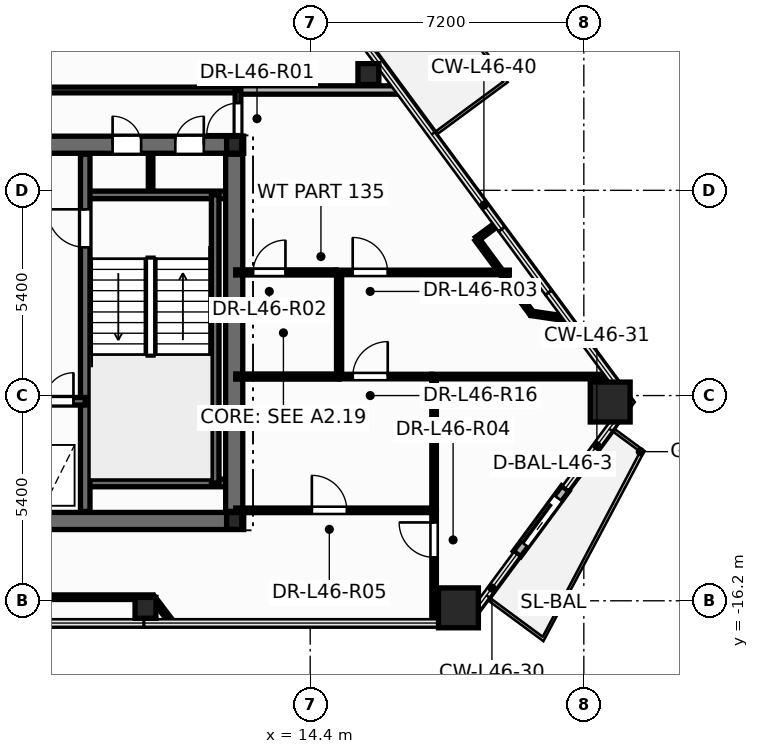
"""IFC4 building model, lengths in metres.
Left out: names, types, materials, properties, quantities, classifications, styles, units other than length and angle.
Written with IfcOpenShell. Run it as: python <this file> out.ifc"""

import sys

from ifc_helpers import new_model, si_unit, direction, frame, frame_2d, origin, origin_2d, place, context, subcontext, project, spatial, rectangle, hollow_rectangle, hollow_circle, i_section, extrude, element, fill, save


model = new_model("IFC4")
c1 = context("Model", 3, precision=1e-05, world=origin(), true_north=direction((0.0, 1.0)))
c2 = subcontext(c1, "Body", "Model", "MODEL_VIEW")
j1 = project(units=[si_unit("LENGTHUNIT", "METRE"), si_unit("PLANEANGLEUNIT", "RADIAN")], contexts=[c1])
p1 = place(None, origin())
s1 = spatial("IfcSite", under=j1, at=p1, CompositionType="ELEMENT")
p2 = place(p1, origin())
s2 = spatial("IfcBuilding", under=s1, at=p2, CompositionType="ELEMENT")
p3 = place(p2, frame((0.0, 0.0, 178.5)))
s3 = spatial("IfcBuildingStorey", under=s2, at=p3, CompositionType="ELEMENT", Elevation=178.5)
for number, where, z_axis, x_axis in (
    (1, (18.301, -16.385, 0.0), (0.0, 0.0, 1.0), (1.0, 0.0, 0.0)),
    (2, (22.294, -10.97, 0.0), (0.0, 0.0, 1.0), (1.0, 0.0, 0.0)),
):
    element("IfcColumn", number, at=place(p3, frame(where, z_axis=z_axis, x_axis=x_axis)), inside=s3, PredefinedType="COLUMN", context=c2, shape_type="SweptSolid", body=[
        extrude(hollow_rectangle(XDim=1.05, YDim=1.05, WallThickness=0.045, at=origin_2d()), origin(), (0.0, 0.0, 1.0), 3.6),
    ])
for number, where, z_axis, x_axis in (
    (3, (10.065, -16.385, 0.0), (0.0, 0.0, 1.0), (1.0, 0.0, 0.0)),
    (4, (15.931, -2.341, 0.0), (0.0, 0.0, 1.0), (1.0, 0.0, 0.0)),
):
    element("IfcColumn", number, at=place(p3, frame(where, z_axis=z_axis, x_axis=x_axis)), inside=s3, PredefinedType="COLUMN", context=c2, shape_type="SweptSolid", body=[
        extrude(hollow_circle(Radius=0.275, WallThickness=0.024, at=origin_2d()), origin(), (0.0, 0.0, 1.0), 3.6),
    ])
for number, where, z_axis, x_axis in (
    (5, (12.4, -14.1, 0.0), (0.0, 0.0, 1.0), (1.0, 0.0, 0.0)),
    (6, (12.4, -4.2, 0.0), (0.0, 0.0, 1.0), (1.0, 0.0, 0.0)),
):
    element("IfcColumn", number, at=place(p3, frame(where, z_axis=z_axis, x_axis=x_axis)), inside=s3, PredefinedType="COLUMN", context=c2, shape_type="SweptSolid", body=[
        extrude(i_section(OverallWidth=0.4, OverallDepth=0.44, WebThickness=0.028, FlangeThickness=0.04, at=origin_2d()), origin(), (0.0, 0.0, 1.0), 3.6),
    ])
p4 = place(p3, frame((19.844, -14.967, -0.015), z_axis=(0.0, 0.0, 1.0), x_axis=(0.593463631131, 0.804860806926, 0.0)))
e7 = element("IfcWall", 7, at=p4, inside=s3, PredefinedType="STANDARD", context=c2, shape_type="SweptSolid", body=[
    extrude(rectangle(XDim=2.14, YDim=0.24, at=frame_2d((1.07, 0.0))), origin(), (0.0, 0.0, 1.0), 2.807),
])
p5 = place(p4, frame((0.32, 0.0, 0.015)))
e8 = element("IfcOpeningElement", 8, at=p5, cuts=e7, PredefinedType="OPENING", context=c2, shape_type="SweptSolid", body=[
    extrude(rectangle(XDim=1.506, YDim=2.204, at=frame_2d((0.75, 1.102))), frame((0.0, 0.13, 0.0), z_axis=(0.0, -1.0, 0.0), x_axis=(1.0, 0.0, 0.0)), (0.0, 0.0, 1.0), 0.26),
])
p6 = place(p3, frame((10.2, -5.52, 0.0), z_axis=(0.0, 0.0, 1.0), x_axis=(0.0, 1.0, 0.0)))
e9 = element("IfcWall", 9, at=p6, inside=s3, PredefinedType="PARTITIONING", context=c2, shape_type="SweptSolid", body=[
    extrude(rectangle(XDim=1.12, YDim=0.12, at=frame_2d((0.56, 0.0))), origin(), (0.0, 0.0, 1.0), 3.35),
])
p7 = place(p3, frame((-12.65, -14.1, 0.0), z_axis=(0.0, 0.0, 1.0), x_axis=(1.0, 0.0, 0.0)))
e10 = element("IfcWall", 10, at=p7, inside=s3, PredefinedType="SHEAR", context=c2, shape_type="SweptSolid", body=[
    extrude(rectangle(XDim=25.3, YDim=0.45, at=frame_2d((12.65, 0.0))), origin(), (0.0, 0.0, 1.0), 3.6),
])
p8 = place(p3, frame((-12.65, -4.2, 0.0), z_axis=(0.0, 0.0, 1.0), x_axis=(1.0, 0.0, 0.0)))
e11 = element("IfcWall", 11, at=p8, inside=s3, PredefinedType="SHEAR", context=c2, shape_type="SweptSolid", body=[
    extrude(rectangle(XDim=25.3, YDim=0.45, at=frame_2d((12.65, 0.0))), origin(), (0.0, 0.0, 1.0), 3.6),
])
p9 = place(p8, frame((1.85, 0.0, 0.0)))
e12 = element("IfcOpeningElement", 12, at=p9, cuts=e11, PredefinedType="OPENING", context=c2, shape_type="SweptSolid", body=[
    extrude(rectangle(XDim=0.756, YDim=2.054, at=frame_2d((0.375, 1.027))), frame((0.0, 0.235, 0.0), z_axis=(0.0, -1.0, 0.0), x_axis=(1.0, 0.0, 0.0)), (0.0, 0.0, 1.0), 0.47),
])
p10 = place(p8, frame((21.85, 0.0, 0.0)))
e13 = element("IfcOpeningElement", 13, at=p10, cuts=e11, PredefinedType="OPENING", context=c2, shape_type="SweptSolid", body=[
    extrude(rectangle(XDim=0.756, YDim=2.054, at=frame_2d((0.375, 1.027))), frame((0.0, 0.235, 0.0), z_axis=(0.0, -1.0, 0.0), x_axis=(1.0, 0.0, 0.0)), (0.0, 0.0, 1.0), 0.47),
])
p11 = place(p8, frame((23.5, 0.0, 0.0)))
e14 = element("IfcOpeningElement", 14, at=p11, cuts=e11, PredefinedType="OPENING", context=c2, shape_type="SweptSolid", body=[
    extrude(rectangle(XDim=0.756, YDim=2.054, at=frame_2d((0.375, 1.027))), frame((0.0, 0.235, 0.0), z_axis=(0.0, -1.0, 0.0), x_axis=(1.0, 0.0, 0.0)), (0.0, 0.0, 1.0), 0.47),
])
p12 = place(p8, frame((5.85, 0.0, 0.0)))
e15 = element("IfcOpeningElement", 15, at=p12, cuts=e11, PredefinedType="OPENING", context=c2, shape_type="SweptSolid", body=[
    extrude(rectangle(XDim=1.006, YDim=2.104, at=frame_2d((0.5, 1.052))), frame((0.0, 0.235, 0.0), z_axis=(0.0, -1.0, 0.0), x_axis=(1.0, 0.0, 0.0)), (0.0, 0.0, 1.0), 0.47),
])
p13 = place(p8, frame((10.35, 0.0, 0.0)))
e16 = element("IfcOpeningElement", 16, at=p13, cuts=e11, PredefinedType="OPENING", context=c2, shape_type="SweptSolid", body=[
    extrude(rectangle(XDim=1.406, YDim=2.154, at=frame_2d((0.7, 1.077))), frame((0.0, 0.235, 0.0), z_axis=(0.0, -1.0, 0.0), x_axis=(1.0, 0.0, 0.0)), (0.0, 0.0, 1.0), 0.47),
])
p14 = place(p8, frame((18.45, 0.0, 0.0)))
e17 = element("IfcOpeningElement", 17, at=p14, cuts=e11, PredefinedType="OPENING", context=c2, shape_type="SweptSolid", body=[
    extrude(rectangle(XDim=1.006, YDim=2.104, at=frame_2d((0.5, 1.052))), frame((0.0, 0.235, 0.0), z_axis=(0.0, -1.0, 0.0), x_axis=(1.0, 0.0, 0.0)), (0.0, 0.0, 1.0), 0.47),
])
for number, where, z_axis, x_axis in (
    (18, (8.48, -5.52, 0.0), (0.0, 0.0, 1.0), (1.0, 0.0, 0.0)),
    (19, (8.48, -13.1, 0.0), (0.0, 0.0, 1.0), (1.0, 0.0, 0.0)),
):
    element("IfcWall", number, at=place(p3, frame(where, z_axis=z_axis, x_axis=x_axis)), inside=s3, PredefinedType="SOLIDWALL", context=c2, shape_type="SweptSolid", body=[
        extrude(rectangle(XDim=3.87, YDim=0.2, at=frame_2d((1.935, 0.0))), origin(), (0.0, 0.0, 1.0), 3.6),
    ])
p15 = place(p3, frame((11.9, -13.1, 0.0), z_axis=(0.0, 0.0, 1.0), x_axis=(0.0, 1.0, 0.0)))
e20 = element("IfcWall", 20, at=p15, inside=s3, PredefinedType="SOLIDWALL", context=c2, shape_type="SweptSolid", body=[
    extrude(rectangle(XDim=7.58, YDim=0.2, at=frame_2d((3.79, 0.0))), origin(), (0.0, 0.0, 1.0), 3.6),
])
p16 = place(p3, frame((8.48, -13.85, 0.0), z_axis=(0.0, 0.0, 1.0), x_axis=(0.0, 1.0, 0.0)))
e21 = element("IfcWall", 21, at=p16, inside=s3, PredefinedType="SHEAR", context=c2, shape_type="SweptSolid", body=[
    extrude(rectangle(XDim=9.4, YDim=0.25, at=frame_2d((4.7, 0.0))), origin(), (0.0, 0.0, 1.0), 3.6),
])
p17 = place(p16, frame((6.95, 0.0, 0.0)))
e22 = element("IfcOpeningElement", 22, at=p17, cuts=e21, PredefinedType="OPENING", context=c2, shape_type="SweptSolid", body=[
    extrude(rectangle(XDim=1.006, YDim=2.104, at=frame_2d((0.5, 1.052))), frame((0.0, 0.135, 0.0), z_axis=(0.0, -1.0, 0.0), x_axis=(1.0, 0.0, 0.0)), (0.0, 0.0, 1.0), 0.27),
])
p18 = place(p3, frame((5.12, -10.95, 0.0), z_axis=(0.0, 0.0, 1.0), x_axis=(1.0, 0.0, 0.0)))
e23 = element("IfcWall", 23, at=p18, inside=s3, PredefinedType="SOLIDWALL", context=c2, shape_type="SweptSolid", body=[
    extrude(rectangle(XDim=3.36, YDim=0.2, at=frame_2d((1.68, 0.0))), origin(), (0.0, 0.0, 1.0), 3.6),
])
p19 = place(p18, frame((0.42, 0.0, 0.0)))
e24 = element("IfcOpeningElement", 24, at=p19, cuts=e23, PredefinedType="OPENING", context=c2, shape_type="SweptSolid", body=[
    extrude(rectangle(XDim=1.106, YDim=2.104, at=frame_2d((0.55, 1.052))), frame((0.0, 0.11, 0.0), z_axis=(0.0, -1.0, 0.0), x_axis=(1.0, 0.0, 0.0)), (0.0, 0.0, 1.0), 0.22),
])
p20 = place(p18, frame((2.3, 0.0, 0.0)))
e25 = element("IfcOpeningElement", 25, at=p20, cuts=e23, PredefinedType="OPENING", context=c2, shape_type="SweptSolid", body=[
    extrude(rectangle(XDim=0.756, YDim=2.054, at=frame_2d((0.375, 1.027))), frame((0.0, 0.11, 0.0), z_axis=(0.0, -1.0, 0.0), x_axis=(1.0, 0.0, 0.0)), (0.0, 0.0, 1.0), 0.22),
])
p21 = place(p3, frame((12.4, -13.85, 0.0), z_axis=(0.0, 0.0, 1.0), x_axis=(0.0, 1.0, 0.0)))
e26 = element("IfcWall", 26, at=p21, inside=s3, PredefinedType="SHEAR", context=c2, shape_type="SweptSolid", body=[
    extrude(rectangle(XDim=9.4, YDim=0.45, at=frame_2d((4.7, 0.0))), origin(), (0.0, 0.0, 1.0), 3.6),
])
p22 = place(p3, frame((1.9, -2.76, 0.0), z_axis=(0.0, 0.0, 1.0), x_axis=(1.0, 0.0, 0.0)))
e27 = element("IfcWall", 27, at=p22, inside=s3, PredefinedType="PARTITIONING", context=c2, shape_type="SweptSolid", body=[
    extrude(rectangle(XDim=10.6, YDim=0.15, at=frame_2d((5.3, 0.0))), origin(), (0.0, 0.0, 1.0), 2.325),
])
p23 = place(p22, frame((0.399, 0.0, 0.0)))
e28 = element("IfcOpeningElement", 28, at=p23, cuts=e27, PredefinedType="OPENING", context=c2, shape_type="SweptSolid", body=[
    extrude(rectangle(XDim=0.956, YDim=2.104, at=frame_2d((0.475, 1.052))), frame((0.0, 0.085, 0.0), z_axis=(0.0, -1.0, 0.0), x_axis=(1.0, 0.0, 0.0)), (0.0, 0.0, 1.0), 0.17),
])
p24 = place(p3, frame((12.44, -13.82, 0.0), z_axis=(0.0, 0.0, 1.0), x_axis=(1.0, 0.0, 0.0)))
e29 = element("IfcWall", 29, at=p24, inside=s3, PredefinedType="PARTITIONING", context=c2, shape_type="SweptSolid", body=[
    extrude(rectangle(XDim=5.22, YDim=0.12, at=frame_2d((2.61, 0.0))), origin(), (0.0, 0.0, 1.0), 2.792),
])
p25 = place(p24, frame((2.003, 0.0, 0.0)))
e30 = element("IfcOpeningElement", 30, at=p25, cuts=e29, PredefinedType="OPENING", context=c2, shape_type="SweptSolid", body=[
    extrude(rectangle(XDim=0.926, YDim=2.104, at=frame_2d((0.46, 1.052))), frame((0.0, 0.07, 0.0), z_axis=(0.0, -1.0, 0.0), x_axis=(1.0, 0.0, 0.0)), (0.0, 0.0, 1.0), 0.14),
])
p26 = place(p3, frame((17.6, -10.3, 0.0), z_axis=(0.0, 0.0, 1.0), x_axis=(1.0, 0.0, 0.0)))
e31 = element("IfcWall", 31, at=p26, inside=s3, PredefinedType="PARTITIONING", context=c2, shape_type="SweptSolid", body=[
    extrude(rectangle(XDim=4.697, YDim=0.12, at=frame_2d((2.348, 0.0))), origin(), (0.0, 0.0, 1.0), 2.325),
])
p27 = place(p3, frame((15.08, -7.56, 0.0), z_axis=(0.0, 0.0, 1.0), x_axis=(1.0, 0.0, 0.0)))
e32 = element("IfcWall", 32, at=p27, inside=s3, PredefinedType="PARTITIONING", context=c2, shape_type="SweptSolid", body=[
    extrude(rectangle(XDim=4.56, YDim=0.12, at=frame_2d((2.28, 0.0))), origin(), (0.0, 0.0, 1.0), 2.325),
])
p28 = place(p27, frame((0.438, 0.0, 0.0)))
e33 = element("IfcOpeningElement", 33, at=p28, cuts=e32, PredefinedType="OPENING", context=c2, shape_type="SweptSolid", body=[
    extrude(rectangle(XDim=0.926, YDim=2.104, at=frame_2d((0.46, 1.052))), frame((0.0, 0.07, 0.0), z_axis=(0.0, -1.0, 0.0), x_axis=(1.0, 0.0, 0.0)), (0.0, 0.0, 1.0), 0.14),
])
p29 = place(p3, frame((12.5, -2.76, 0.0), z_axis=(0.0, 0.0, 1.0), x_axis=(1.0, 0.0, 0.0)))
e34 = element("IfcWall", 34, at=p29, inside=s3, PredefinedType="PARTITIONING", context=c2, shape_type="SweptSolid", body=[
    extrude(rectangle(XDim=4.237, YDim=0.22, at=frame_2d((2.118, 0.0))), origin(), (0.0, 0.0, 1.0), 2.792),
])
p30 = place(p3, frame((6.383, -16.106, 0.0), z_axis=(0.0, 0.0, 1.0), x_axis=(1.0, 0.0, 0.0)))
e35 = element("IfcWall", 35, at=p30, inside=s3, PredefinedType="PARTITIONING", context=c2, shape_type="SweptSolid", body=[
    extrude(rectangle(XDim=3.868, YDim=0.12, at=frame_2d((1.934, 0.0))), origin(), (0.0, 0.0, 1.0), 2.792),
])
p31 = place(p3, frame((17.66, -13.82, 0.0), z_axis=(0.0, 0.0, 1.0), x_axis=(0.0, 1.0, 0.0)))
e36 = element("IfcWall", 36, at=p31, inside=s3, PredefinedType="PARTITIONING", context=c2, shape_type="SweptSolid", body=[
    extrude(rectangle(XDim=3.52, YDim=0.12, at=frame_2d((1.76, 0.0))), origin(), (0.0, 0.0, 1.0), 3.35),
])
p32 = place(p3, frame((17.66, -16.786, 0.0), z_axis=(0.0, 0.0, 1.0), x_axis=(0.0, 1.0, 0.0)))
e37 = element("IfcWall", 37, at=p32, inside=s3, PredefinedType="PARTITIONING", context=c2, shape_type="SweptSolid", body=[
    extrude(rectangle(XDim=2.966, YDim=0.12, at=frame_2d((1.483, 0.0))), origin(), (0.0, 0.0, 1.0), 2.792),
])
p33 = place(p32, frame((1.727, 0.0, 0.0)))
e38 = element("IfcOpeningElement", 38, at=p33, cuts=e37, PredefinedType="OPENING", context=c2, shape_type="SweptSolid", body=[
    extrude(rectangle(XDim=0.926, YDim=2.104, at=frame_2d((0.46, 1.052))), frame((0.0, 0.07, 0.0), z_axis=(0.0, -1.0, 0.0), x_axis=(1.0, 0.0, 0.0)), (0.0, 0.0, 1.0), 0.14),
])
p34 = place(p3, frame((12.44, -7.56, 0.0), z_axis=(0.0, 0.0, 1.0), x_axis=(1.0, 0.0, 0.0)))
e39 = element("IfcWall", 39, at=p34, inside=s3, PredefinedType="PARTITIONING", context=c2, shape_type="SweptSolid", body=[
    extrude(rectangle(XDim=2.638, YDim=0.135, at=frame_2d((1.319, 0.0))), origin(), (0.0, 0.0, 1.0), 2.792),
])
p35 = place(p34, frame((0.458, 0.0, 0.0)))
e40 = element("IfcOpeningElement", 40, at=p35, cuts=e39, PredefinedType="OPENING", context=c2, shape_type="SweptSolid", body=[
    extrude(rectangle(XDim=0.856, YDim=2.104, at=frame_2d((0.425, 1.052))), frame((0.0, 0.078, 0.0), z_axis=(0.0, -1.0, 0.0), x_axis=(1.0, 0.0, 0.0)), (0.0, 0.0, 1.0), 0.155),
])
p36 = place(p3, frame((15.16, -10.3, 0.0), z_axis=(0.0, 0.0, 1.0), x_axis=(0.0, 1.0, 0.0)))
e41 = element("IfcWall", 41, at=p36, inside=s3, PredefinedType="PARTITIONING", context=c2, shape_type="SweptSolid", body=[
    extrude(rectangle(XDim=2.74, YDim=0.135, at=frame_2d((1.37, 0.0))), origin(), (0.0, 0.0, 1.0), 3.35),
])
p37 = place(p3, frame((12.44, -10.3, 0.0), z_axis=(0.0, 0.0, 1.0), x_axis=(1.0, 0.0, 0.0)))
e42 = element("IfcWall", 42, at=p37, inside=s3, PredefinedType="PARTITIONING", context=c2, shape_type="SweptSolid", body=[
    extrude(rectangle(XDim=2.72, YDim=0.135, at=frame_2d((1.36, 0.0))), origin(), (0.0, 0.0, 1.0), 2.792),
])
p38 = place(p3, frame((15.16, -10.3, 0.0), z_axis=(0.0, 0.0, 1.0), x_axis=(1.0, 0.0, 0.0)))
e43 = element("IfcWall", 43, at=p38, inside=s3, PredefinedType="PARTITIONING", context=c2, shape_type="SweptSolid", body=[
    extrude(rectangle(XDim=2.438, YDim=0.12, at=frame_2d((1.219, 0.0))), origin(), (0.0, 0.0, 1.0), 3.35),
])
p39 = place(p38, frame((0.36, 0.0, 0.0)))
e44 = element("IfcOpeningElement", 44, at=p39, cuts=e43, PredefinedType="OPENING", context=c2, shape_type="SweptSolid", body=[
    extrude(rectangle(XDim=0.926, YDim=2.104, at=frame_2d((0.46, 1.052))), frame((0.0, 0.07, 0.0), z_axis=(0.0, -1.0, 0.0), x_axis=(1.0, 0.0, 0.0)), (0.0, 0.0, 1.0), 0.14),
])
p40 = place(p3, frame((20.227, -8.638, 0.0), z_axis=(0.0, 0.0, 1.0), x_axis=(-0.593517740009, 0.804820906969, 0.0)))
e45 = element("IfcWall", 45, at=p40, inside=s3, PredefinedType="PARTITIONING", context=c2, shape_type="SweptSolid", body=[
    extrude(rectangle(XDim=2.43, YDim=0.12, at=frame_2d((1.215, 0.0))), origin(), (0.0, 0.0, 1.0), 3.35),
])
p41 = place(p3, frame((12.5, -4.24, 0.0), z_axis=(0.0, 0.0, 1.0), x_axis=(0.0, 1.0, 0.0)))
e46 = element("IfcWall", 46, at=p41, inside=s3, PredefinedType="PARTITIONING", context=c2, shape_type="SweptSolid", body=[
    extrude(rectangle(XDim=1.48, YDim=0.15, at=frame_2d((0.74, 0.0))), origin(), (0.0, 0.0, 1.0), 2.325),
])
p42 = place(p41, frame((0.315, 0.0, 0.0)))
e47 = element("IfcOpeningElement", 47, at=p42, cuts=e46, PredefinedType="OPENING", context=c2, shape_type="SweptSolid", body=[
    extrude(rectangle(XDim=0.826, YDim=2.104, at=frame_2d((0.41, 1.052))), frame((0.0, 0.085, 0.0), z_axis=(0.0, -1.0, 0.0), x_axis=(1.0, 0.0, 0.0)), (0.0, 0.0, 1.0), 0.17),
])
p43 = place(p3, frame((21.067, -8.763, 0.0), z_axis=(0.0, 0.0, 1.0), x_axis=(-0.989242005698, 0.146288257089, 0.0)))
e48 = element("IfcWall", 48, at=p43, inside=s3, PredefinedType="PARTITIONING", context=c2, shape_type="SweptSolid", body=[
    extrude(rectangle(XDim=0.849, YDim=0.12, at=frame_2d((0.425, 0.0))), origin(), (0.0, 0.0, 1.0), 2.792),
])
p44 = place(p3, frame((10.251, -16.106, 0.0), z_axis=(0.0, 0.0, 1.0), x_axis=(0.604450021585, -0.796643063991, 0.0)))
e49 = element("IfcWall", 49, at=p44, inside=s3, PredefinedType="PARTITIONING", context=c2, shape_type="SweptSolid", body=[
    extrude(rectangle(XDim=0.841, YDim=0.12, at=frame_2d((0.42, 0.0))), origin(), (0.0, 0.0, 1.0), 2.792),
])
p45 = place(p3, frame((18.784, -6.683, 0.0), z_axis=(0.0, 0.0, 1.0), x_axis=(0.804698441933, 0.59368376898, 0.0)))
e50 = element("IfcWall", 50, at=p45, inside=s3, PredefinedType="PARTITIONING", context=c2, shape_type="SweptSolid", body=[
    extrude(rectangle(XDim=0.67, YDim=0.12, at=frame_2d((0.335, 0.0))), origin(), (0.0, 0.0, 1.0), 2.792),
])
p46 = place(p5, origin())
e51 = element("IfcDoor", 51, at=p46, inside=s3, OperationType="SLIDING_TO_RIGHT", PredefinedType="DOOR", context=c2, shape_type="SweptSolid", body=[
    extrude(rectangle(XDim=1.5, YDim=2.2, at=frame_2d((0.75, 1.1))), frame((0.0, 0.025, 0.0), z_axis=(0.0, -1.0, 0.0), x_axis=(1.0, 0.0, 0.0)), (0.0, 0.0, 1.0), 0.05),
])
fill(e8, e51)
p47 = place(p17, origin())
e52 = element("IfcDoor", 52, at=p47, inside=s3, OperationType="SINGLE_SWING_RIGHT", PredefinedType="DOOR", context=c2, shape_type="SweptSolid", body=[
    extrude(rectangle(XDim=1.0, YDim=2.1, at=frame_2d((0.5, 1.05))), frame((0.0, 0.025, 0.0), z_axis=(0.0, -1.0, 0.0), x_axis=(1.0, 0.0, 0.0)), (0.0, 0.0, 1.0), 0.05),
])
fill(e22, e52)
p48 = place(p20, origin())
e53 = element("IfcDoor", 53, at=p48, inside=s3, OperationType="SINGLE_SWING_RIGHT", PredefinedType="DOOR", context=c2, shape_type="SweptSolid", body=[
    extrude(rectangle(XDim=0.75, YDim=2.05, at=frame_2d((0.375, 1.025))), frame((0.0, 0.025, 0.0), z_axis=(0.0, -1.0, 0.0), x_axis=(1.0, 0.0, 0.0)), (0.0, 0.0, 1.0), 0.05),
])
fill(e25, e53)
p49 = place(p10, origin())
e54 = element("IfcDoor", 54, at=p49, inside=s3, OperationType="SINGLE_SWING_LEFT", PredefinedType="DOOR", context=c2, shape_type="SweptSolid", body=[
    extrude(rectangle(XDim=0.75, YDim=2.05, at=frame_2d((0.375, 1.025))), frame((0.0, 0.025, 0.0), z_axis=(0.0, -1.0, 0.0), x_axis=(1.0, 0.0, 0.0)), (0.0, 0.0, 1.0), 0.05),
])
fill(e13, e54)
p50 = place(p11, origin())
e55 = element("IfcDoor", 55, at=p50, inside=s3, OperationType="SINGLE_SWING_RIGHT", PredefinedType="DOOR", context=c2, shape_type="SweptSolid", body=[
    extrude(rectangle(XDim=0.75, YDim=2.05, at=frame_2d((0.375, 1.025))), frame((0.0, 0.025, 0.0), z_axis=(0.0, -1.0, 0.0), x_axis=(1.0, 0.0, 0.0)), (0.0, 0.0, 1.0), 0.05),
])
fill(e14, e55)
p51 = place(p42, origin())
e56 = element("IfcDoor", 56, at=p51, inside=s3, OperationType="SINGLE_SWING_LEFT", PredefinedType="DOOR", context=c2, shape_type="SweptSolid", body=[
    extrude(rectangle(XDim=0.82, YDim=2.1, at=frame_2d((0.41, 1.05))), frame((0.0, 0.025, 0.0), z_axis=(0.0, -1.0, 0.0), x_axis=(1.0, 0.0, 0.0)), (0.0, 0.0, 1.0), 0.05),
])
fill(e47, e56)
p52 = place(p35, origin())
e57 = element("IfcDoor", 57, at=p52, inside=s3, OperationType="SINGLE_SWING_RIGHT", PredefinedType="DOOR", context=c2, shape_type="SweptSolid", body=[
    extrude(rectangle(XDim=0.85, YDim=2.1, at=frame_2d((0.425, 1.05))), frame((0.0, 0.025, 0.0), z_axis=(0.0, -1.0, 0.0), x_axis=(1.0, 0.0, 0.0)), (0.0, 0.0, 1.0), 0.05),
])
fill(e40, e57)
p53 = place(p28, origin())
e58 = element("IfcDoor", 58, at=p53, inside=s3, OperationType="SINGLE_SWING_LEFT", PredefinedType="DOOR", context=c2, shape_type="SweptSolid", body=[
    extrude(rectangle(XDim=0.92, YDim=2.1, at=frame_2d((0.46, 1.05))), frame((0.0, 0.025, 0.0), z_axis=(0.0, -1.0, 0.0), x_axis=(1.0, 0.0, 0.0)), (0.0, 0.0, 1.0), 0.05),
])
fill(e33, e58)
p54 = place(p33, origin())
e59 = element("IfcDoor", 59, at=p54, inside=s3, OperationType="SINGLE_SWING_RIGHT", PredefinedType="DOOR", context=c2, shape_type="SweptSolid", body=[
    extrude(rectangle(XDim=0.92, YDim=2.1, at=frame_2d((0.46, 1.05))), frame((0.0, 0.025, 0.0), z_axis=(0.0, -1.0, 0.0), x_axis=(1.0, 0.0, 0.0)), (0.0, 0.0, 1.0), 0.05),
])
fill(e38, e59)
p55 = place(p25, origin())
e60 = element("IfcDoor", 60, at=p55, inside=s3, OperationType="SINGLE_SWING_LEFT", PredefinedType="DOOR", context=c2, shape_type="SweptSolid", body=[
    extrude(rectangle(XDim=0.92, YDim=2.1, at=frame_2d((0.46, 1.05))), frame((0.0, 0.025, 0.0), z_axis=(0.0, -1.0, 0.0), x_axis=(1.0, 0.0, 0.0)), (0.0, 0.0, 1.0), 0.05),
])
fill(e30, e60)
p56 = place(p39, origin())
e61 = element("IfcDoor", 61, at=p56, inside=s3, OperationType="SINGLE_SWING_RIGHT", PredefinedType="DOOR", context=c2, shape_type="SweptSolid", body=[
    extrude(rectangle(XDim=0.92, YDim=2.1, at=frame_2d((0.46, 1.05))), frame((0.0, 0.025, 0.0), z_axis=(0.0, -1.0, 0.0), x_axis=(1.0, 0.0, 0.0)), (0.0, 0.0, 1.0), 0.05),
])
fill(e44, e61)
save(model, sys.argv[1])
